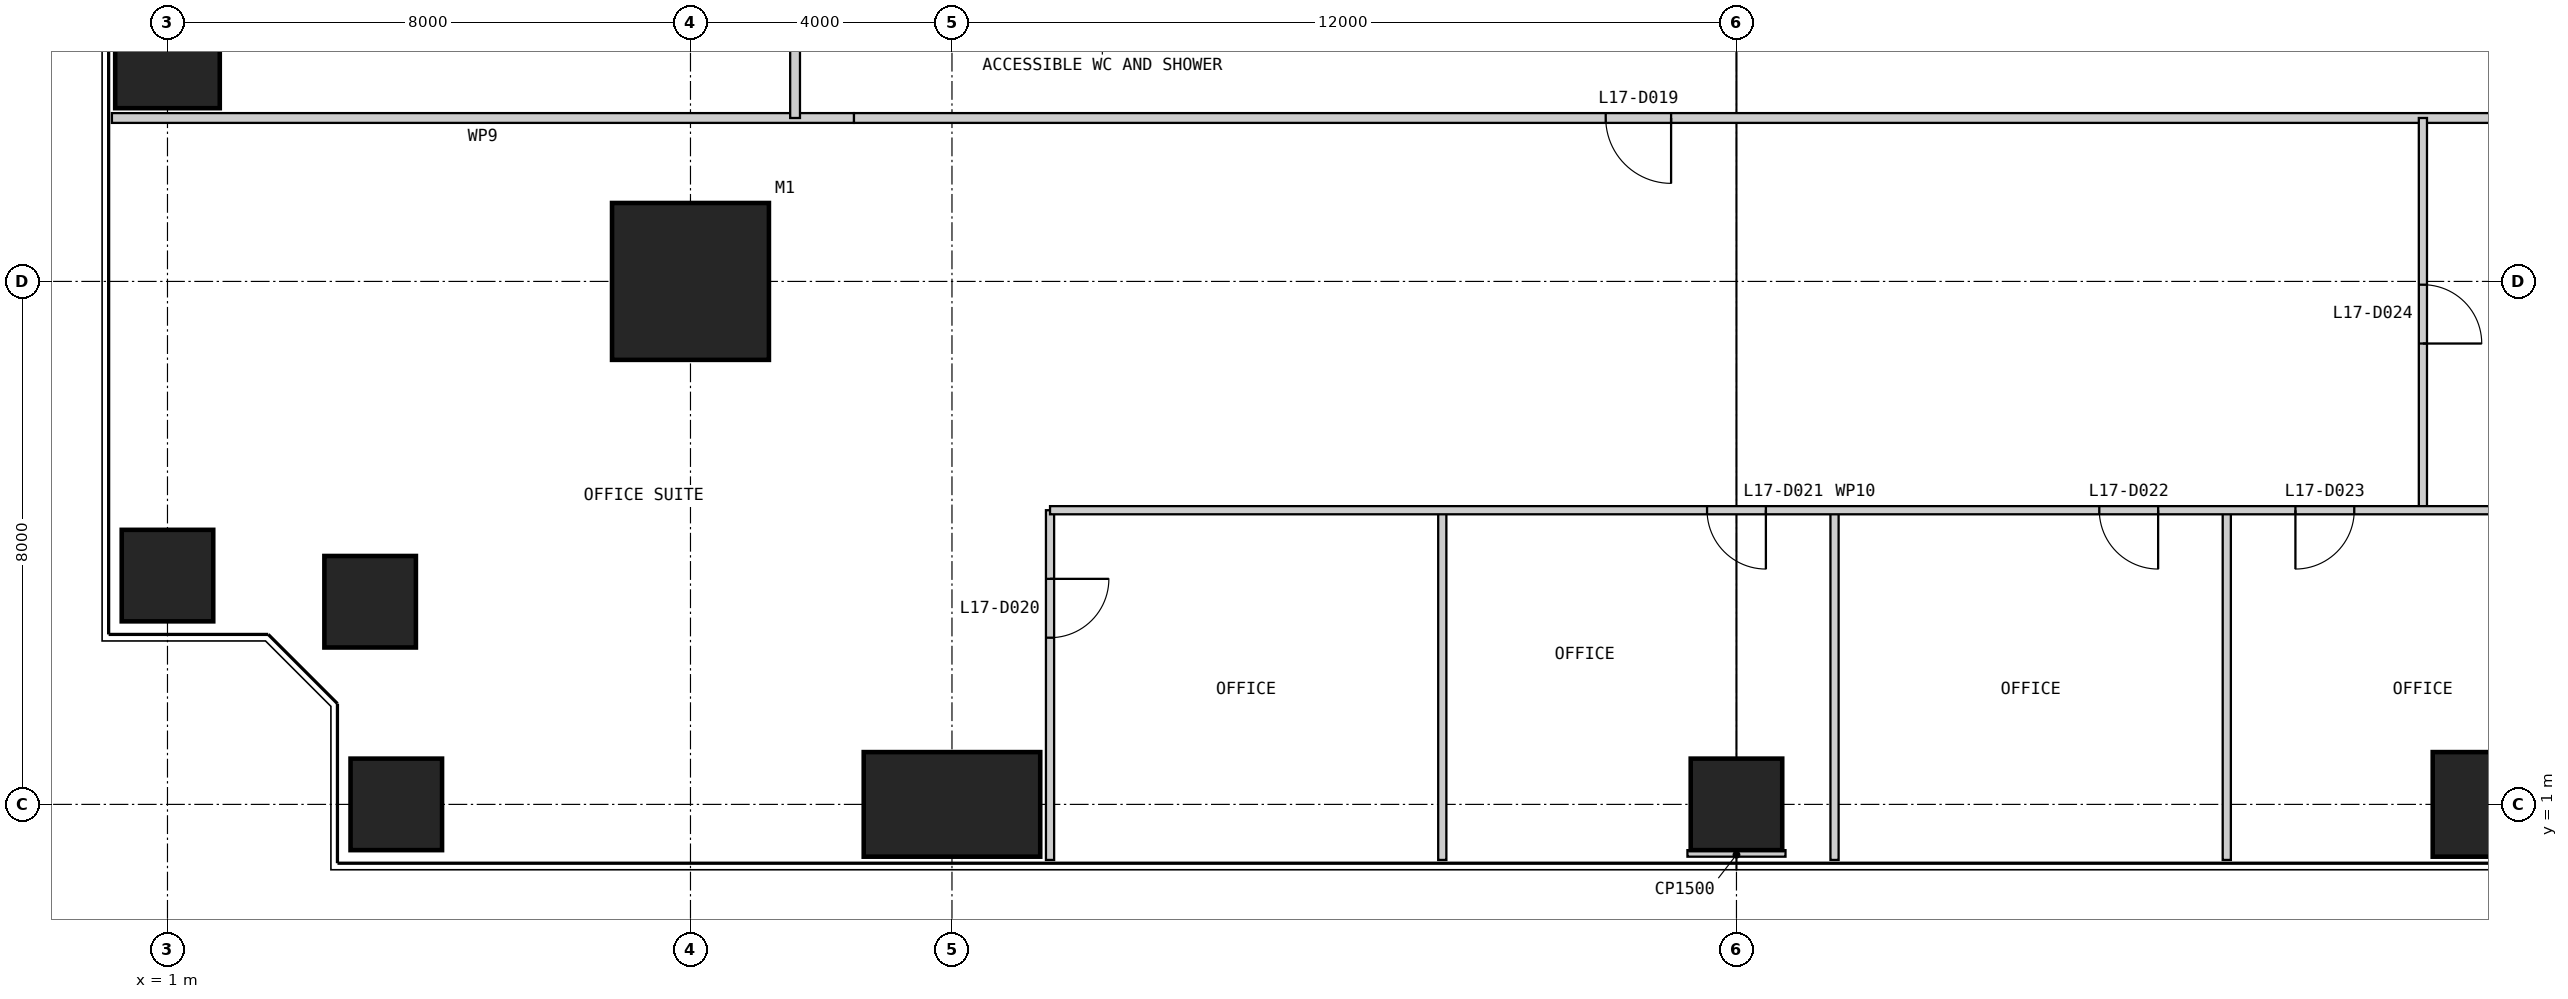
"""IFC4 building model, lengths in metres.
Left out: names, types, materials, properties, quantities, classifications, styles, units other than length and angle.
Written with IfcOpenShell. Run it as: python <this file> out.ifc"""

import sys

from ifc_helpers import new_model, si_unit, direction, frame, frame_2d, origin, origin_2d, place, context, subcontext, project, spatial, rectangle, extrude, element, fill, save


model = new_model("IFC4")
c1 = context("Model", 3, precision=1e-05, world=origin(), true_north=direction((0.0, 1.0)))
c2 = subcontext(c1, "Body", "Model", "MODEL_VIEW")
j1 = project(units=[si_unit("LENGTHUNIT", "METRE"), si_unit("PLANEANGLEUNIT", "RADIAN")], contexts=[c1])
p1 = place(None, origin())
s1 = spatial("IfcSite", under=j1, at=p1, CompositionType="ELEMENT")
p2 = place(p1, origin())
s2 = spatial("IfcBuilding", under=s1, at=p2, CompositionType="ELEMENT")
p3 = place(p2, frame((0.0, 0.0, 75.0)))
s3 = spatial("IfcBuildingStorey", under=s2, at=p3, CompositionType="ELEMENT", Elevation=75.0)
p4 = place(p3, frame((9.0, 9.0, 0.0), z_axis=(0.0, 0.0, 1.0), x_axis=(1.0, 0.0, 0.0)))
e1 = element("IfcColumn", 1, at=p4, inside=s3, PredefinedType="COLUMN", context=c2, shape_type="SweptSolid", body=[
    extrude(rectangle(XDim=2.4, YDim=2.4, at=origin_2d()), origin(), (0.0, 0.0, 1.0), 4.0),
])
p5 = place(p3, frame((4.5, 1.0, 0.0), z_axis=(0.0, 0.0, 1.0), x_axis=(1.0, 0.0, 0.0)))
e2 = element("IfcColumn", 2, at=p5, inside=s3, PredefinedType="COLUMN", context=c2, shape_type="SweptSolid", body=[
    extrude(rectangle(XDim=1.4, YDim=1.4, at=origin_2d()), origin(), (0.0, 0.0, 1.0), 4.0),
])
p6 = place(p3, frame((13.0, 1.0, 0.0), z_axis=(0.0, 0.0, 1.0), x_axis=(1.0, 0.0, 0.0)))
e3 = element("IfcColumn", 3, at=p6, inside=s3, PredefinedType="COLUMN", context=c2, shape_type="SweptSolid", body=[
    extrude(rectangle(XDim=2.7, YDim=1.6, at=origin_2d()), origin(), (0.0, 0.0, 1.0), 4.0),
])
p7 = place(p3, frame((25.0, 1.0, 0.0), z_axis=(0.0, 0.0, 1.0), x_axis=(1.0, 0.0, 0.0)))
e4 = element("IfcColumn", 4, at=p7, inside=s3, PredefinedType="COLUMN", context=c2, shape_type="SweptSolid", body=[
    extrude(rectangle(XDim=1.4, YDim=1.4, at=origin_2d()), origin(), (0.0, 0.0, 1.0), 4.0),
])
p8 = place(p3, frame((37.0, 1.0, 0.0), z_axis=(0.0, 0.0, 1.0), x_axis=(1.0, 0.0, 0.0)))
e5 = element("IfcColumn", 5, at=p8, inside=s3, PredefinedType="COLUMN", context=c2, shape_type="SweptSolid", body=[
    extrude(rectangle(XDim=2.7, YDim=1.6, at=origin_2d()), origin(), (0.0, 0.0, 1.0), 4.0),
])
p9 = place(p3, frame((1.0, 13.0, 0.0), z_axis=(0.0, 0.0, 1.0), x_axis=(1.0, 0.0, 0.0)))
e6 = element("IfcColumn", 6, at=p9, inside=s3, PredefinedType="COLUMN", context=c2, shape_type="SweptSolid", body=[
    extrude(rectangle(XDim=1.6, YDim=2.7, at=origin_2d()), origin(), (0.0, 0.0, 1.0), 4.0),
])
for number, where, z_axis, x_axis in (
    (7, (1.0, 4.5, 0.0), (0.0, 0.0, 1.0), (1.0, 0.0, 0.0)),
    (8, (4.1, 4.1, 0.0), (0.0, 0.0, 1.0), (1.0, 0.0, 0.0)),
):
    element("IfcColumn", number, at=place(p3, frame(where, z_axis=z_axis, x_axis=x_axis)), inside=s3, PredefinedType="COLUMN", context=c2, shape_type="SweptSolid", body=[
        extrude(rectangle(XDim=1.4, YDim=1.4, at=origin_2d()), origin(), (0.0, 0.0, 1.0), 4.0),
    ])
p10 = place(p3, frame((11.5, 11.5, 0.0), z_axis=(0.0, 0.0, 1.0), x_axis=(1.0, 0.0, 0.0)))
e9 = element("IfcWall", 9, at=p10, inside=s3, PredefinedType="PARTITIONING", context=c2, shape_type="SweptSolid", body=[
    extrude(rectangle(XDim=27.0, YDim=0.15, at=frame_2d((13.5, 0.0))), origin(), (0.0, 0.0, 1.0), 3.85),
])
p11 = place(p10, frame((11.5, 0.0, 0.0)))
e10 = element("IfcOpeningElement", 10, at=p11, cuts=e9, PredefinedType="OPENING", context=c2, shape_type="SweptSolid", body=[
    extrude(rectangle(XDim=1.0, YDim=2.2, at=frame_2d((0.5, 1.1))), frame((0.0, 0.085, 0.0), z_axis=(0.0, -1.0, 0.0), x_axis=(1.0, 0.0, 0.0)), (0.0, 0.0, 1.0), 0.17),
])
p12 = place(p3, frame((0.15, 11.5, 0.0), z_axis=(0.0, 0.0, 1.0), x_axis=(1.0, 0.0, 0.0)))
e11 = element("IfcWall", 11, at=p12, inside=s3, PredefinedType="PARTITIONING", context=c2, shape_type="SweptSolid", body=[
    extrude(rectangle(XDim=11.35, YDim=0.15, at=frame_2d((5.675, 0.0))), origin(), (0.0, 0.0, 1.0), 3.85),
])
p13 = place(p3, frame((14.5, 0.15, 0.0), z_axis=(0.0, 0.0, 1.0), x_axis=(0.0, 1.0, 0.0)))
e12 = element("IfcWall", 12, at=p13, inside=s3, PredefinedType="PARTITIONING", context=c2, shape_type="SweptSolid", body=[
    extrude(rectangle(XDim=5.35, YDim=0.125, at=frame_2d((2.675, 0.0))), origin(), (0.0, 0.0, 1.0), 3.85),
])
p14 = place(p13, frame((3.4, 0.0, 0.0)))
e13 = element("IfcOpeningElement", 13, at=p14, cuts=e12, PredefinedType="OPENING", context=c2, shape_type="SweptSolid", body=[
    extrude(rectangle(XDim=0.9, YDim=2.2, at=frame_2d((0.45, 1.1))), frame((0.0, 0.073, 0.0), z_axis=(0.0, -1.0, 0.0), x_axis=(1.0, 0.0, 0.0)), (0.0, 0.0, 1.0), 0.145),
])
for number, where, z_axis, x_axis in (
    (14, (20.5, 0.15, 0.0), (0.0, 0.0, 1.0), (0.0, 1.0, 0.0)),
    (15, (26.5, 0.15, 0.0), (0.0, 0.0, 1.0), (0.0, 1.0, 0.0)),
    (16, (32.5, 0.15, 0.0), (0.0, 0.0, 1.0), (0.0, 1.0, 0.0)),
):
    element("IfcWall", number, at=place(p3, frame(where, z_axis=z_axis, x_axis=x_axis)), inside=s3, PredefinedType="PARTITIONING", context=c2, shape_type="SweptSolid", body=[
        extrude(rectangle(XDim=5.35, YDim=0.125, at=frame_2d((2.675, 0.0))), origin(), (0.0, 0.0, 1.0), 3.85),
    ])
p15 = place(p3, frame((35.5, 5.5, 0.0), z_axis=(0.0, 0.0, 1.0), x_axis=(0.0, 1.0, 0.0)))
e17 = element("IfcWall", 17, at=p15, inside=s3, PredefinedType="PARTITIONING", context=c2, shape_type="SweptSolid", body=[
    extrude(rectangle(XDim=6.0, YDim=0.125, at=frame_2d((3.0, 0.0))), origin(), (0.0, 0.0, 1.0), 3.85),
])
p16 = place(p15, frame((2.55, 0.0, 0.0)))
e18 = element("IfcOpeningElement", 18, at=p16, cuts=e17, PredefinedType="OPENING", context=c2, shape_type="SweptSolid", body=[
    extrude(rectangle(XDim=0.9, YDim=2.2, at=frame_2d((0.45, 1.1))), frame((0.0, 0.073, 0.0), z_axis=(0.0, -1.0, 0.0), x_axis=(1.0, 0.0, 0.0)), (0.0, 0.0, 1.0), 0.145),
])
p17 = place(p3, frame((14.5, 5.5, 0.0), z_axis=(0.0, 0.0, 1.0), x_axis=(1.0, 0.0, 0.0)))
e19 = element("IfcWall", 19, at=p17, inside=s3, PredefinedType="PARTITIONING", context=c2, shape_type="SweptSolid", body=[
    extrude(rectangle(XDim=24.0, YDim=0.125, at=frame_2d((12.0, 0.0))), origin(), (0.0, 0.0, 1.0), 3.85),
])
p18 = place(p17, frame((10.05, 0.0, 0.0)))
e20 = element("IfcOpeningElement", 20, at=p18, cuts=e19, PredefinedType="OPENING", context=c2, shape_type="SweptSolid", body=[
    extrude(rectangle(XDim=0.9, YDim=2.2, at=frame_2d((0.45, 1.1))), frame((0.0, 0.073, 0.0), z_axis=(0.0, -1.0, 0.0), x_axis=(1.0, 0.0, 0.0)), (0.0, 0.0, 1.0), 0.145),
])
p19 = place(p17, frame((16.05, 0.0, 0.0)))
e21 = element("IfcOpeningElement", 21, at=p19, cuts=e19, PredefinedType="OPENING", context=c2, shape_type="SweptSolid", body=[
    extrude(rectangle(XDim=0.9, YDim=2.2, at=frame_2d((0.45, 1.1))), frame((0.0, 0.073, 0.0), z_axis=(0.0, -1.0, 0.0), x_axis=(1.0, 0.0, 0.0)), (0.0, 0.0, 1.0), 0.145),
])
p20 = place(p17, frame((19.05, 0.0, 0.0)))
e22 = element("IfcOpeningElement", 22, at=p20, cuts=e19, PredefinedType="OPENING", context=c2, shape_type="SweptSolid", body=[
    extrude(rectangle(XDim=0.9, YDim=2.2, at=frame_2d((0.45, 1.1))), frame((0.0, 0.073, 0.0), z_axis=(0.0, -1.0, 0.0), x_axis=(1.0, 0.0, 0.0)), (0.0, 0.0, 1.0), 0.145),
])
p21 = place(p3, frame((10.6, 39.4, 0.0), z_axis=(0.0, 0.0, 1.0), x_axis=(0.0, -1.0, 0.0)))
e23 = element("IfcWall", 23, at=p21, inside=s3, PredefinedType="PARTITIONING", context=c2, shape_type="SweptSolid", body=[
    extrude(rectangle(XDim=27.9, YDim=0.15, at=frame_2d((13.95, 0.0))), origin(), (0.0, 0.0, 1.0), 3.85),
])
p22 = place(p21, frame((3.4, 0.0, 0.0)))
e24 = element("IfcOpeningElement", 24, at=p22, cuts=e23, PredefinedType="OPENING", context=c2, shape_type="SweptSolid", body=[
    extrude(rectangle(XDim=1.0, YDim=2.2, at=frame_2d((0.5, 1.1))), frame((0.0, 0.085, 0.0), z_axis=(0.0, -1.0, 0.0), x_axis=(1.0, 0.0, 0.0)), (0.0, 0.0, 1.0), 0.17),
])
p23 = place(p21, frame((10.15, 0.0, 0.0)))
e25 = element("IfcOpeningElement", 25, at=p23, cuts=e23, PredefinedType="OPENING", context=c2, shape_type="SweptSolid", body=[
    extrude(rectangle(XDim=1.0, YDim=2.2, at=frame_2d((0.5, 1.1))), frame((0.0, 0.085, 0.0), z_axis=(0.0, -1.0, 0.0), x_axis=(1.0, 0.0, 0.0)), (0.0, 0.0, 1.0), 0.17),
])
p24 = place(p21, frame((17.65, 0.0, 0.0)))
e26 = element("IfcOpeningElement", 26, at=p24, cuts=e23, PredefinedType="OPENING", context=c2, shape_type="SweptSolid", body=[
    extrude(rectangle(XDim=1.0, YDim=2.2, at=frame_2d((0.5, 1.1))), frame((0.0, 0.085, 0.0), z_axis=(0.0, -1.0, 0.0), x_axis=(1.0, 0.0, 0.0)), (0.0, 0.0, 1.0), 0.17),
])
p25 = place(p21, frame((24.4, 0.0, 0.0)))
e27 = element("IfcOpeningElement", 27, at=p25, cuts=e23, PredefinedType="OPENING", context=c2, shape_type="SweptSolid", body=[
    extrude(rectangle(XDim=1.0, YDim=2.2, at=frame_2d((0.5, 1.1))), frame((0.0, 0.085, 0.0), z_axis=(0.0, -1.0, 0.0), x_axis=(1.0, 0.0, 0.0)), (0.0, 0.0, 1.0), 0.17),
])
p26 = place(p3, frame((25.0, 0.2, 0.0), z_axis=(0.0, 0.0, 1.0), x_axis=(0.0, 1.0, 0.0)))
e28 = element("IfcWall", 28, at=p26, inside=s3, PredefinedType="PARTITIONING", context=c2, shape_type="SweptSolid", body=[
    extrude(rectangle(XDim=0.1, YDim=1.5, at=frame_2d((0.05, 0.0))), origin(), (0.0, 0.0, 1.0), 3.85),
])
p27 = place(p11, frame((1.0, 0.0, 0.0), z_axis=(0.0, 0.0, 1.0), x_axis=(-1.0, 0.0, 0.0)))
e29 = element("IfcDoor", 29, at=p27, inside=s3, OperationType="SINGLE_SWING_LEFT", PredefinedType="DOOR", context=c2, shape_type="SweptSolid", body=[
    extrude(rectangle(XDim=1.0, YDim=2.2, at=frame_2d((0.5, 1.1))), frame((0.0, 0.025, 0.0), z_axis=(0.0, -1.0, 0.0), x_axis=(1.0, 0.0, 0.0)), (0.0, 0.0, 1.0), 0.05),
])
fill(e10, e29)
p28 = place(p14, frame((0.9, 0.0, 0.0), z_axis=(0.0, 0.0, 1.0), x_axis=(-1.0, 0.0, 0.0)))
e30 = element("IfcDoor", 30, at=p28, inside=s3, OperationType="SINGLE_SWING_LEFT", PredefinedType="DOOR", context=c2, shape_type="SweptSolid", body=[
    extrude(rectangle(XDim=0.9, YDim=2.2, at=frame_2d((0.45, 1.1))), frame((0.0, 0.025, 0.0), z_axis=(0.0, -1.0, 0.0), x_axis=(1.0, 0.0, 0.0)), (0.0, 0.0, 1.0), 0.05),
])
fill(e13, e30)
p29 = place(p18, frame((0.9, 0.0, 0.0), z_axis=(0.0, 0.0, 1.0), x_axis=(-1.0, 0.0, 0.0)))
e31 = element("IfcDoor", 31, at=p29, inside=s3, OperationType="SINGLE_SWING_LEFT", PredefinedType="DOOR", context=c2, shape_type="SweptSolid", body=[
    extrude(rectangle(XDim=0.9, YDim=2.2, at=frame_2d((0.45, 1.1))), frame((0.0, 0.025, 0.0), z_axis=(0.0, -1.0, 0.0), x_axis=(1.0, 0.0, 0.0)), (0.0, 0.0, 1.0), 0.05),
])
fill(e20, e31)
p30 = place(p19, frame((0.9, 0.0, 0.0), z_axis=(0.0, 0.0, 1.0), x_axis=(-1.0, 0.0, 0.0)))
e32 = element("IfcDoor", 32, at=p30, inside=s3, OperationType="SINGLE_SWING_LEFT", PredefinedType="DOOR", context=c2, shape_type="SweptSolid", body=[
    extrude(rectangle(XDim=0.9, YDim=2.2, at=frame_2d((0.45, 1.1))), frame((0.0, 0.025, 0.0), z_axis=(0.0, -1.0, 0.0), x_axis=(1.0, 0.0, 0.0)), (0.0, 0.0, 1.0), 0.05),
])
fill(e21, e32)
p31 = place(p20, frame((0.9, 0.0, 0.0), z_axis=(0.0, 0.0, 1.0), x_axis=(-1.0, 0.0, 0.0)))
e33 = element("IfcDoor", 33, at=p31, inside=s3, OperationType="SINGLE_SWING_RIGHT", PredefinedType="DOOR", context=c2, shape_type="SweptSolid", body=[
    extrude(rectangle(XDim=0.9, YDim=2.2, at=frame_2d((0.45, 1.1))), frame((0.0, 0.025, 0.0), z_axis=(0.0, -1.0, 0.0), x_axis=(1.0, 0.0, 0.0)), (0.0, 0.0, 1.0), 0.05),
])
fill(e22, e33)
p32 = place(p16, frame((0.9, 0.0, 0.0), z_axis=(0.0, 0.0, 1.0), x_axis=(-1.0, 0.0, 0.0)))
e34 = element("IfcDoor", 34, at=p32, inside=s3, OperationType="SINGLE_SWING_RIGHT", PredefinedType="DOOR", context=c2, shape_type="SweptSolid", body=[
    extrude(rectangle(XDim=0.9, YDim=2.2, at=frame_2d((0.45, 1.1))), frame((0.0, 0.025, 0.0), z_axis=(0.0, -1.0, 0.0), x_axis=(1.0, 0.0, 0.0)), (0.0, 0.0, 1.0), 0.05),
])
fill(e18, e34)
save(model, sys.argv[1])
